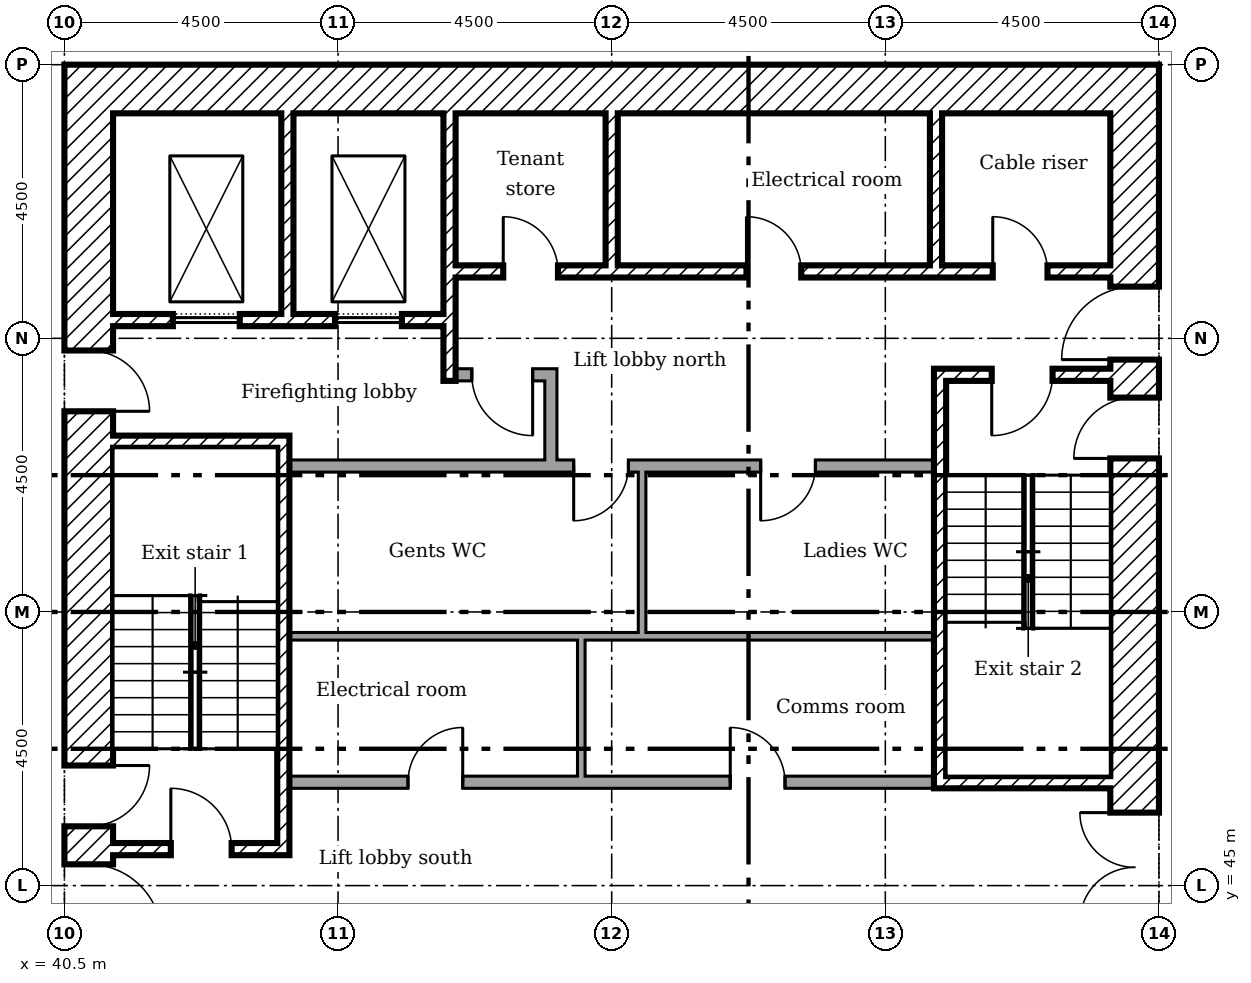
"""IFC4 building model, lengths in metres.
Left out: names, types, materials, properties, quantities, classifications, styles, units other than length and angle.
Written with IfcOpenShell. Run it as: python <this file> out.ifc"""

import sys

from ifc_helpers import new_model, si_unit, direction, frame, frame_2d, origin, place, context, subcontext, project, spatial, rectangle, extrude, element, fill, save


model = new_model("IFC4")
c1 = context("Model", 3, precision=1e-05, world=origin(), true_north=direction((0.0, 1.0)))
c2 = subcontext(c1, "Body", "Model", "MODEL_VIEW")
j1 = project(units=[si_unit("LENGTHUNIT", "METRE"), si_unit("PLANEANGLEUNIT", "RADIAN")], contexts=[c1])
p1 = place(None, origin())
s1 = spatial("IfcSite", under=j1, at=p1, CompositionType="ELEMENT")
p2 = place(p1, origin())
s2 = spatial("IfcBuilding", under=s1, at=p2, CompositionType="ELEMENT")
p3 = place(p2, frame((0.0, 0.0, 79.8)))
s3 = spatial("IfcBuildingStorey", under=s2, at=p3, CompositionType="ELEMENT", Elevation=79.8)
p4 = place(p3, frame((58.1, 40.5, 0.0), z_axis=(0.0, 0.0, 1.0), x_axis=(0.0, 1.0, 0.0)))
e1 = element("IfcWall", 1, at=p4, inside=s3, PredefinedType="SHEAR", context=c2, shape_type="SweptSolid", body=[
    extrude(rectangle(XDim=18.0, YDim=0.8, at=frame_2d((9.0, 0.0))), origin(), (0.0, 0.0, 1.0), 3.35),
])
p5 = place(p4, frame((13.15, 0.0, 0.0)))
e2 = element("IfcOpeningElement", 2, at=p5, cuts=e1, PredefinedType="OPENING", context=c2, shape_type="SweptSolid", body=[
    extrude(rectangle(XDim=1.2, YDim=2.1, at=frame_2d((0.6, 1.05))), frame((0.0, 0.41, 0.0), z_axis=(0.0, -1.0, 0.0), x_axis=(1.0, 0.0, 0.0)), (0.0, 0.0, 1.0), 0.82),
])
p6 = place(p4, frame((3.9, 0.0, 0.0)))
e3 = element("IfcOpeningElement", 3, at=p6, cuts=e1, PredefinedType="OPENING", context=c2, shape_type="SweptSolid", body=[
    extrude(rectangle(XDim=1.8, YDim=2.1, at=frame_2d((0.9, 1.05))), frame((0.0, 0.41, 0.0), z_axis=(0.0, -1.0, 0.0), x_axis=(1.0, 0.0, 0.0)), (0.0, 0.0, 1.0), 0.82),
])
p7 = place(p4, frame((11.525, 0.0, 0.0)))
e4 = element("IfcOpeningElement", 4, at=p7, cuts=e1, PredefinedType="OPENING", context=c2, shape_type="SweptSolid", body=[
    extrude(rectangle(XDim=1.0, YDim=2.1, at=frame_2d((0.5, 1.05))), frame((0.0, 0.41, 0.0), z_axis=(0.0, -1.0, 0.0), x_axis=(1.0, 0.0, 0.0)), (0.0, 0.0, 1.0), 0.82),
])
p8 = place(p3, frame((41.3, 58.1, 0.0)))
e5 = element("IfcWall", 5, at=p8, inside=s3, PredefinedType="SHEAR", context=c2, shape_type="SweptSolid", body=[
    extrude(rectangle(XDim=16.4, YDim=0.8, at=frame_2d((8.2, 0.0))), origin(), (0.0, 0.0, 1.0), 3.35),
])
p9 = place(p3, frame((40.9, 40.5, 0.0), z_axis=(0.0, 0.0, 1.0), x_axis=(0.0, 1.0, 0.0)))
e6 = element("IfcWall", 6, at=p9, inside=s3, PredefinedType="SHEAR", context=c2, shape_type="SweptSolid", body=[
    extrude(rectangle(XDim=18.0, YDim=0.8, at=frame_2d((9.0, 0.0))), origin(), (0.0, 0.0, 1.0), 3.35),
])
p10 = place(p9, frame((3.65, 0.0, 0.0)))
e7 = element("IfcOpeningElement", 7, at=p10, cuts=e6, PredefinedType="OPENING", context=c2, shape_type="SweptSolid", body=[
    extrude(rectangle(XDim=1.2, YDim=2.1, at=frame_2d((0.6, 1.05))), frame((0.0, 0.41, 0.0), z_axis=(0.0, -1.0, 0.0), x_axis=(1.0, 0.0, 0.0)), (0.0, 0.0, 1.0), 0.82),
])
p11 = place(p9, frame((5.475, 0.0, 0.0)))
e8 = element("IfcOpeningElement", 8, at=p11, cuts=e6, PredefinedType="OPENING", context=c2, shape_type="SweptSolid", body=[
    extrude(rectangle(XDim=1.0, YDim=2.1, at=frame_2d((0.5, 1.05))), frame((0.0, 0.41, 0.0), z_axis=(0.0, -1.0, 0.0), x_axis=(1.0, 0.0, 0.0)), (0.0, 0.0, 1.0), 0.82),
])
p12 = place(p9, frame((12.3, 0.0, 0.0)))
e9 = element("IfcOpeningElement", 9, at=p12, cuts=e6, PredefinedType="OPENING", context=c2, shape_type="SweptSolid", body=[
    extrude(rectangle(XDim=1.0, YDim=2.1, at=frame_2d((0.5, 1.05))), frame((0.0, 0.41, 0.0), z_axis=(0.0, -1.0, 0.0), x_axis=(1.0, 0.0, 0.0)), (0.0, 0.0, 1.0), 0.82),
])
p13 = place(p3, frame((44.167, 57.7, 0.0), z_axis=(0.0, 0.0, 1.0), x_axis=(0.0, -1.0, 0.0)))
e10 = element("IfcWall", 10, at=p13, inside=s3, PredefinedType="SHEAR", context=c2, shape_type="SweptSolid", body=[
    extrude(rectangle(XDim=3.3, YDim=0.2, at=frame_2d((1.65, 0.0))), origin(), (0.0, 0.0, 1.0), 3.35),
])
p14 = place(p3, frame((46.833, 57.7, 0.0), z_axis=(0.0, 0.0, 1.0), x_axis=(0.0, -1.0, 0.0)))
e11 = element("IfcWall", 11, at=p14, inside=s3, PredefinedType="SHEAR", context=c2, shape_type="SweptSolid", body=[
    extrude(rectangle(XDim=4.4, YDim=0.2, at=frame_2d((2.2, 0.0))), origin(), (0.0, 0.0, 1.0), 3.35),
])
for number, where, z_axis, x_axis in (
    (12, (49.5, 57.7, 0.0), (0.0, 0.0, 1.0), (0.0, -1.0, 0.0)),
    (13, (54.833, 57.7, 0.0), (0.0, 0.0, 1.0), (0.0, -1.0, 0.0)),
):
    element("IfcWall", number, at=place(p3, frame(where, z_axis=z_axis, x_axis=x_axis)), inside=s3, PredefinedType="SHEAR", context=c2, shape_type="SweptSolid", body=[
        extrude(rectangle(XDim=2.5, YDim=0.2, at=frame_2d((1.25, 0.0))), origin(), (0.0, 0.0, 1.0), 3.35),
    ])
p15 = place(p3, frame((48.5, 51.9, 0.0), z_axis=(0.0, 0.0, 1.0), x_axis=(0.0, 1.0, 0.0)))
e14 = element("IfcWall", 14, at=p15, inside=s3, PredefinedType="PARTITIONING", context=c2, shape_type="SweptSolid", body=[
    extrude(rectangle(XDim=1.6, YDim=0.2, at=frame_2d((0.8, 0.0))), origin(), (0.0, 0.0, 1.0), 3.35),
])
p16 = place(p3, frame((46.933, 53.4, 0.0)))
e15 = element("IfcWall", 15, at=p16, inside=s3, PredefinedType="PARTITIONING", context=c2, shape_type="SweptSolid", body=[
    extrude(rectangle(XDim=1.467, YDim=0.2, at=frame_2d((0.733, 0.0))), origin(), (0.0, 0.0, 1.0), 3.35),
])
p17 = place(p16, frame((0.267, 0.0, 0.0)))
e16 = element("IfcOpeningElement", 16, at=p17, cuts=e15, PredefinedType="OPENING", context=c2, shape_type="SweptSolid", body=[
    extrude(rectangle(XDim=1.0, YDim=2.1, at=frame_2d((0.5, 1.05))), frame((0.0, 0.11, 0.0), z_axis=(0.0, -1.0, 0.0), x_axis=(1.0, 0.0, 0.0)), (0.0, 0.0, 1.0), 0.22),
])
p18 = place(p3, frame((46.933, 55.1, 0.0)))
e17 = element("IfcWall", 17, at=p18, inside=s3, PredefinedType="SHEAR", context=c2, shape_type="SweptSolid", body=[
    extrude(rectangle(XDim=10.767, YDim=0.2, at=frame_2d((5.383, 0.0))), origin(), (0.0, 0.0, 1.0), 3.35),
])
p19 = place(p18, frame((8.833, 0.0, 0.0)))
e18 = element("IfcOpeningElement", 18, at=p19, cuts=e17, PredefinedType="OPENING", context=c2, shape_type="SweptSolid", body=[
    extrude(rectangle(XDim=0.9, YDim=2.1, at=frame_2d((0.45, 1.05))), frame((0.0, 0.11, 0.0), z_axis=(0.0, -1.0, 0.0), x_axis=(1.0, 0.0, 0.0)), (0.0, 0.0, 1.0), 0.22),
])
p20 = place(p18, frame((0.783, 0.0, 0.0)))
e19 = element("IfcOpeningElement", 19, at=p20, cuts=e17, PredefinedType="OPENING", context=c2, shape_type="SweptSolid", body=[
    extrude(rectangle(XDim=0.9, YDim=2.1, at=frame_2d((0.45, 1.05))), frame((0.0, 0.11, 0.0), z_axis=(0.0, -1.0, 0.0), x_axis=(1.0, 0.0, 0.0)), (0.0, 0.0, 1.0), 0.22),
])
p21 = place(p18, frame((4.783, 0.0, 0.0)))
e20 = element("IfcOpeningElement", 20, at=p21, cuts=e17, PredefinedType="OPENING", context=c2, shape_type="SweptSolid", body=[
    extrude(rectangle(XDim=0.9, YDim=2.1, at=frame_2d((0.45, 1.05))), frame((0.0, 0.11, 0.0), z_axis=(0.0, -1.0, 0.0), x_axis=(1.0, 0.0, 0.0)), (0.0, 0.0, 1.0), 0.22),
])
p22 = place(p3, frame((41.3, 54.3, 0.0)))
e21 = element("IfcWall", 21, at=p22, inside=s3, PredefinedType="SHEAR", context=c2, shape_type="SweptSolid", body=[
    extrude(rectangle(XDim=5.433, YDim=0.2, at=frame_2d((2.717, 0.0))), origin(), (0.0, 0.0, 1.0), 3.35),
])
p23 = place(p22, frame((0.983, 0.0, 0.0)))
e22 = element("IfcOpeningElement", 22, at=p23, cuts=e21, PredefinedType="OPENING", context=c2, shape_type="SweptSolid", body=[
    extrude(rectangle(XDim=1.1, YDim=2.1, at=frame_2d((0.55, 1.05))), frame((0.0, 0.11, 0.0), z_axis=(0.0, -1.0, 0.0), x_axis=(1.0, 0.0, 0.0)), (0.0, 0.0, 1.0), 0.22),
])
p24 = place(p22, frame((3.65, 0.0, 0.0)))
e23 = element("IfcOpeningElement", 23, at=p24, cuts=e21, PredefinedType="OPENING", context=c2, shape_type="SweptSolid", body=[
    extrude(rectangle(XDim=1.1, YDim=2.1, at=frame_2d((0.55, 1.05))), frame((0.0, 0.11, 0.0), z_axis=(0.0, -1.0, 0.0), x_axis=(1.0, 0.0, 0.0)), (0.0, 0.0, 1.0), 0.22),
])
p25 = place(p3, frame((44.1, 45.5, 0.0), z_axis=(0.0, 0.0, 1.0), x_axis=(0.0, 1.0, 0.0)))
e24 = element("IfcWall", 24, at=p25, inside=s3, PredefinedType="SHEAR", context=c2, shape_type="SweptSolid", body=[
    extrude(rectangle(XDim=6.9, YDim=0.2, at=frame_2d((3.45, 0.0))), origin(), (0.0, 0.0, 1.0), 3.35),
])
p26 = place(p3, frame((41.3, 52.3, 0.0)))
e25 = element("IfcWall", 25, at=p26, inside=s3, PredefinedType="SHEAR", context=c2, shape_type="SweptSolid", body=[
    extrude(rectangle(XDim=2.7, YDim=0.2, at=frame_2d((1.35, 0.0))), origin(), (0.0, 0.0, 1.0), 3.35),
])
p27 = place(p3, frame((41.3, 45.6, 0.0)))
e26 = element("IfcWall", 26, at=p27, inside=s3, PredefinedType="SHEAR", context=c2, shape_type="SweptSolid", body=[
    extrude(rectangle(XDim=2.7, YDim=0.2, at=frame_2d((1.35, 0.0))), origin(), (0.0, 0.0, 1.0), 3.35),
])
p28 = place(p27, frame((0.95, 0.0, 0.0)))
e27 = element("IfcOpeningElement", 27, at=p28, cuts=e26, PredefinedType="OPENING", context=c2, shape_type="SweptSolid", body=[
    extrude(rectangle(XDim=1.0, YDim=2.1, at=frame_2d((0.5, 1.05))), frame((0.0, 0.11, 0.0), z_axis=(0.0, -1.0, 0.0), x_axis=(1.0, 0.0, 0.0)), (0.0, 0.0, 1.0), 0.22),
])
p29 = place(p3, frame((54.8, 53.4, 0.0)))
e28 = element("IfcWall", 28, at=p29, inside=s3, PredefinedType="SHEAR", context=c2, shape_type="SweptSolid", body=[
    extrude(rectangle(XDim=2.9, YDim=0.2, at=frame_2d((1.45, 0.0))), origin(), (0.0, 0.0, 1.0), 3.35),
])
p30 = place(p29, frame((0.95, 0.0, 0.0)))
e29 = element("IfcOpeningElement", 29, at=p30, cuts=e28, PredefinedType="OPENING", context=c2, shape_type="SweptSolid", body=[
    extrude(rectangle(XDim=1.0, YDim=2.1, at=frame_2d((0.5, 1.05))), frame((0.0, 0.11, 0.0), z_axis=(0.0, -1.0, 0.0), x_axis=(1.0, 0.0, 0.0)), (0.0, 0.0, 1.0), 0.22),
])
p31 = place(p3, frame((54.8, 46.7, 0.0)))
e30 = element("IfcWall", 30, at=p31, inside=s3, PredefinedType="SHEAR", context=c2, shape_type="SweptSolid", body=[
    extrude(rectangle(XDim=2.9, YDim=0.2, at=frame_2d((1.45, 0.0))), origin(), (0.0, 0.0, 1.0), 3.35),
])
p32 = place(p3, frame((54.9, 46.8, 0.0), z_axis=(0.0, 0.0, 1.0), x_axis=(0.0, 1.0, 0.0)))
e31 = element("IfcWall", 31, at=p32, inside=s3, PredefinedType="SHEAR", context=c2, shape_type="SweptSolid", body=[
    extrude(rectangle(XDim=6.5, YDim=0.2, at=frame_2d((3.25, 0.0))), origin(), (0.0, 0.0, 1.0), 3.35),
])
p33 = place(p3, frame((44.2, 51.9, 0.0)))
e32 = element("IfcWall", 32, at=p33, inside=s3, PredefinedType="PARTITIONING", context=c2, shape_type="SweptSolid", body=[
    extrude(rectangle(XDim=10.6, YDim=0.2, at=frame_2d((5.3, 0.0))), origin(), (0.0, 0.0, 1.0), 3.35),
])
p34 = place(p33, frame((4.675, 0.0, 0.0)))
e33 = element("IfcOpeningElement", 33, at=p34, cuts=e32, PredefinedType="OPENING", context=c2, shape_type="SweptSolid", body=[
    extrude(rectangle(XDim=0.9, YDim=2.1, at=frame_2d((0.45, 1.05))), frame((0.0, 0.11, 0.0), z_axis=(0.0, -1.0, 0.0), x_axis=(1.0, 0.0, 0.0)), (0.0, 0.0, 1.0), 0.22),
])
p35 = place(p33, frame((7.75, 0.0, 0.0)))
e34 = element("IfcOpeningElement", 34, at=p35, cuts=e32, PredefinedType="OPENING", context=c2, shape_type="SweptSolid", body=[
    extrude(rectangle(XDim=0.9, YDim=2.1, at=frame_2d((0.45, 1.05))), frame((0.0, 0.11, 0.0), z_axis=(0.0, -1.0, 0.0), x_axis=(1.0, 0.0, 0.0)), (0.0, 0.0, 1.0), 0.22),
])
p36 = place(p3, frame((44.2, 46.7, 0.0)))
e35 = element("IfcWall", 35, at=p36, inside=s3, PredefinedType="PARTITIONING", context=c2, shape_type="SweptSolid", body=[
    extrude(rectangle(XDim=10.6, YDim=0.2, at=frame_2d((5.3, 0.0))), origin(), (0.0, 0.0, 1.0), 3.35),
])
p37 = place(p36, frame((1.95, 0.0, 0.0)))
e36 = element("IfcOpeningElement", 36, at=p37, cuts=e35, PredefinedType="OPENING", context=c2, shape_type="SweptSolid", body=[
    extrude(rectangle(XDim=0.9, YDim=2.1, at=frame_2d((0.45, 1.05))), frame((0.0, 0.11, 0.0), z_axis=(0.0, -1.0, 0.0), x_axis=(1.0, 0.0, 0.0)), (0.0, 0.0, 1.0), 0.22),
])
p38 = place(p36, frame((7.25, 0.0, 0.0)))
e37 = element("IfcOpeningElement", 37, at=p38, cuts=e35, PredefinedType="OPENING", context=c2, shape_type="SweptSolid", body=[
    extrude(rectangle(XDim=0.9, YDim=2.1, at=frame_2d((0.45, 1.05))), frame((0.0, 0.11, 0.0), z_axis=(0.0, -1.0, 0.0), x_axis=(1.0, 0.0, 0.0)), (0.0, 0.0, 1.0), 0.22),
])
p39 = place(p3, frame((49.0, 46.8, 0.0), z_axis=(0.0, 0.0, 1.0), x_axis=(0.0, 1.0, 0.0)))
e38 = element("IfcWall", 38, at=p39, inside=s3, PredefinedType="PARTITIONING", context=c2, shape_type="SweptSolid", body=[
    extrude(rectangle(XDim=2.363, YDim=0.125, at=frame_2d((1.181, 0.0))), origin(), (0.0, 0.0, 1.0), 3.35),
])
p40 = place(p3, frame((49.0, 49.1, 0.0), z_axis=(0.0, 0.0, 1.0), x_axis=(-1.0, 0.0, 0.0)))
e39 = element("IfcWall", 39, at=p40, inside=s3, PredefinedType="PARTITIONING", context=c2, shape_type="SweptSolid", body=[
    extrude(rectangle(XDim=4.8, YDim=0.125, at=frame_2d((2.4, 0.0))), origin(), (0.0, 0.0, 1.0), 3.35),
])
p41 = place(p3, frame((50.062, 49.1, 0.0), z_axis=(0.0, 0.0, 1.0), x_axis=(-1.0, 0.0, 0.0)))
e40 = element("IfcWall", 40, at=p41, inside=s3, PredefinedType="PARTITIONING", context=c2, shape_type="SweptSolid", body=[
    extrude(rectangle(XDim=1.0, YDim=0.125, at=frame_2d((0.5, 0.0))), origin(), (0.0, 0.0, 1.0), 3.35),
])
p42 = place(p3, frame((54.8, 49.1, 0.0), z_axis=(0.0, 0.0, 1.0), x_axis=(-1.0, 0.0, 0.0)))
e41 = element("IfcWall", 41, at=p42, inside=s3, PredefinedType="PARTITIONING", context=c2, shape_type="SweptSolid", body=[
    extrude(rectangle(XDim=4.8, YDim=0.125, at=frame_2d((2.4, 0.0))), origin(), (0.0, 0.0, 1.0), 3.35),
])
p43 = place(p3, frame((50.0, 49.163, 0.0), z_axis=(0.0, 0.0, 1.0), x_axis=(0.0, 1.0, 0.0)))
e42 = element("IfcWall", 42, at=p43, inside=s3, PredefinedType="PARTITIONING", context=c2, shape_type="SweptSolid", body=[
    extrude(rectangle(XDim=2.637, YDim=0.125, at=frame_2d((1.319, 0.0))), origin(), (0.0, 0.0, 1.0), 3.35),
])
p44 = place(p5, origin())
e43 = element("IfcDoor", 43, at=p44, inside=s3, OperationType="SINGLE_SWING_RIGHT", PredefinedType="DOOR", context=c2, shape_type="SweptSolid", body=[
    extrude(rectangle(XDim=1.2, YDim=2.1, at=frame_2d((0.6, 1.05))), frame((0.0, 0.025, 0.0), z_axis=(0.0, -1.0, 0.0), x_axis=(1.0, 0.0, 0.0)), (0.0, 0.0, 1.0), 0.05),
])
fill(e2, e43)
p45 = place(p6, origin())
e44 = element("IfcDoor", 44, at=p45, inside=s3, OperationType="DOUBLE_DOOR_SINGLE_SWING", PredefinedType="DOOR", context=c2, shape_type="SweptSolid", body=[
    extrude(rectangle(XDim=1.8, YDim=2.1, at=frame_2d((0.9, 1.05))), frame((0.0, 0.025, 0.0), z_axis=(0.0, -1.0, 0.0), x_axis=(1.0, 0.0, 0.0)), (0.0, 0.0, 1.0), 0.05),
])
fill(e3, e44)
p46 = place(p10, frame((1.2, 0.0, 0.0), x_axis=(-1.0, 0.0, 0.0)))
e45 = element("IfcDoor", 45, at=p46, inside=s3, OperationType="SINGLE_SWING_LEFT", PredefinedType="DOOR", context=c2, shape_type="SweptSolid", body=[
    extrude(rectangle(XDim=1.2, YDim=2.1, at=frame_2d((0.6, 1.05))), frame((0.0, 0.025, 0.0), z_axis=(0.0, -1.0, 0.0), x_axis=(1.0, 0.0, 0.0)), (0.0, 0.0, 1.0), 0.05),
])
fill(e7, e45)
p47 = place(p28, origin())
e46 = element("IfcDoor", 46, at=p47, inside=s3, OperationType="SINGLE_SWING_RIGHT", PredefinedType="DOOR", context=c2, shape_type="SweptSolid", body=[
    extrude(rectangle(XDim=1.0, YDim=2.1, at=frame_2d((0.5, 1.05))), frame((0.0, 0.025, 0.0), z_axis=(0.0, -1.0, 0.0), x_axis=(1.0, 0.0, 0.0)), (0.0, 0.0, 1.0), 0.05),
])
fill(e27, e46)
p48 = place(p11, frame((1.0, 0.0, 0.0), x_axis=(-1.0, 0.0, 0.0)))
e47 = element("IfcDoor", 47, at=p48, inside=s3, OperationType="SINGLE_SWING_RIGHT", PredefinedType="DOOR", context=c2, shape_type="SweptSolid", body=[
    extrude(rectangle(XDim=1.0, YDim=2.1, at=frame_2d((0.5, 1.05))), frame((0.0, 0.025, 0.0), z_axis=(0.0, -1.0, 0.0), x_axis=(1.0, 0.0, 0.0)), (0.0, 0.0, 1.0), 0.05),
])
fill(e8, e47)
p49 = place(p30, frame((1.0, 0.0, 0.0), x_axis=(-1.0, 0.0, 0.0)))
e48 = element("IfcDoor", 48, at=p49, inside=s3, OperationType="SINGLE_SWING_LEFT", PredefinedType="DOOR", context=c2, shape_type="SweptSolid", body=[
    extrude(rectangle(XDim=1.0, YDim=2.1, at=frame_2d((0.5, 1.05))), frame((0.0, 0.025, 0.0), z_axis=(0.0, -1.0, 0.0), x_axis=(1.0, 0.0, 0.0)), (0.0, 0.0, 1.0), 0.05),
])
fill(e29, e48)
p50 = place(p7, origin())
e49 = element("IfcDoor", 49, at=p50, inside=s3, OperationType="SINGLE_SWING_RIGHT", PredefinedType="DOOR", context=c2, shape_type="SweptSolid", body=[
    extrude(rectangle(XDim=1.0, YDim=2.1, at=frame_2d((0.5, 1.05))), frame((0.0, 0.025, 0.0), z_axis=(0.0, -1.0, 0.0), x_axis=(1.0, 0.0, 0.0)), (0.0, 0.0, 1.0), 0.05),
])
fill(e4, e49)
p51 = place(p17, frame((1.0, 0.0, 0.0), x_axis=(-1.0, 0.0, 0.0)))
e50 = element("IfcDoor", 50, at=p51, inside=s3, OperationType="SINGLE_SWING_RIGHT", PredefinedType="DOOR", context=c2, shape_type="SweptSolid", body=[
    extrude(rectangle(XDim=1.0, YDim=2.1, at=frame_2d((0.5, 1.05))), frame((0.0, 0.025, 0.0), z_axis=(0.0, -1.0, 0.0), x_axis=(1.0, 0.0, 0.0)), (0.0, 0.0, 1.0), 0.05),
])
fill(e16, e50)
p52 = place(p12, frame((1.0, 0.0, 0.0), x_axis=(-1.0, 0.0, 0.0)))
e51 = element("IfcDoor", 51, at=p52, inside=s3, OperationType="SINGLE_SWING_LEFT", PredefinedType="DOOR", context=c2, shape_type="SweptSolid", body=[
    extrude(rectangle(XDim=1.0, YDim=2.1, at=frame_2d((0.5, 1.05))), frame((0.0, 0.025, 0.0), z_axis=(0.0, -1.0, 0.0), x_axis=(1.0, 0.0, 0.0)), (0.0, 0.0, 1.0), 0.05),
])
fill(e9, e51)
p53 = place(p19, origin())
e52 = element("IfcDoor", 52, at=p53, inside=s3, OperationType="SINGLE_SWING_RIGHT", PredefinedType="DOOR", context=c2, shape_type="SweptSolid", body=[
    extrude(rectangle(XDim=0.9, YDim=2.1, at=frame_2d((0.45, 1.05))), frame((0.0, 0.025, 0.0), z_axis=(0.0, -1.0, 0.0), x_axis=(1.0, 0.0, 0.0)), (0.0, 0.0, 1.0), 0.05),
])
fill(e18, e52)
p54 = place(p20, origin())
e53 = element("IfcDoor", 53, at=p54, inside=s3, OperationType="SINGLE_SWING_RIGHT", PredefinedType="DOOR", context=c2, shape_type="SweptSolid", body=[
    extrude(rectangle(XDim=0.9, YDim=2.1, at=frame_2d((0.45, 1.05))), frame((0.0, 0.025, 0.0), z_axis=(0.0, -1.0, 0.0), x_axis=(1.0, 0.0, 0.0)), (0.0, 0.0, 1.0), 0.05),
])
fill(e19, e53)
p55 = place(p21, origin())
e54 = element("IfcDoor", 54, at=p55, inside=s3, OperationType="SINGLE_SWING_RIGHT", PredefinedType="DOOR", context=c2, shape_type="SweptSolid", body=[
    extrude(rectangle(XDim=0.9, YDim=2.1, at=frame_2d((0.45, 1.05))), frame((0.0, 0.025, 0.0), z_axis=(0.0, -1.0, 0.0), x_axis=(1.0, 0.0, 0.0)), (0.0, 0.0, 1.0), 0.05),
])
fill(e20, e54)
p56 = place(p37, origin())
e55 = element("IfcDoor", 55, at=p56, inside=s3, OperationType="SINGLE_SWING_LEFT", PredefinedType="DOOR", context=c2, shape_type="SweptSolid", body=[
    extrude(rectangle(XDim=0.9, YDim=2.1, at=frame_2d((0.45, 1.05))), frame((0.0, 0.025, 0.0), z_axis=(0.0, -1.0, 0.0), x_axis=(1.0, 0.0, 0.0)), (0.0, 0.0, 1.0), 0.05),
])
fill(e36, e55)
p57 = place(p38, origin())
e56 = element("IfcDoor", 56, at=p57, inside=s3, OperationType="SINGLE_SWING_RIGHT", PredefinedType="DOOR", context=c2, shape_type="SweptSolid", body=[
    extrude(rectangle(XDim=0.9, YDim=2.1, at=frame_2d((0.45, 1.05))), frame((0.0, 0.025, 0.0), z_axis=(0.0, -1.0, 0.0), x_axis=(1.0, 0.0, 0.0)), (0.0, 0.0, 1.0), 0.05),
])
fill(e37, e56)
p58 = place(p34, frame((0.9, 0.0, 0.0), x_axis=(-1.0, 0.0, 0.0)))
e57 = element("IfcDoor", 57, at=p58, inside=s3, OperationType="SINGLE_SWING_LEFT", PredefinedType="DOOR", context=c2, shape_type="SweptSolid", body=[
    extrude(rectangle(XDim=0.9, YDim=2.1, at=frame_2d((0.45, 1.05))), frame((0.0, 0.025, 0.0), z_axis=(0.0, -1.0, 0.0), x_axis=(1.0, 0.0, 0.0)), (0.0, 0.0, 1.0), 0.05),
])
fill(e33, e57)
p59 = place(p35, frame((0.9, 0.0, 0.0), x_axis=(-1.0, 0.0, 0.0)))
e58 = element("IfcDoor", 58, at=p59, inside=s3, OperationType="SINGLE_SWING_LEFT", PredefinedType="DOOR", context=c2, shape_type="SweptSolid", body=[
    extrude(rectangle(XDim=0.9, YDim=2.1, at=frame_2d((0.45, 1.05))), frame((0.0, 0.025, 0.0), z_axis=(0.0, -1.0, 0.0), x_axis=(1.0, 0.0, 0.0)), (0.0, 0.0, 1.0), 0.05),
])
fill(e34, e58)
p60 = place(p23, origin())
e59 = element("IfcDoor", 59, at=p60, inside=s3, OperationType="SLIDING_TO_LEFT", PredefinedType="DOOR", context=c2, shape_type="SweptSolid", body=[
    extrude(rectangle(XDim=1.1, YDim=2.1, at=frame_2d((0.55, 1.05))), frame((0.0, 0.025, 0.0), z_axis=(0.0, -1.0, 0.0), x_axis=(1.0, 0.0, 0.0)), (0.0, 0.0, 1.0), 0.05),
])
fill(e22, e59)
p61 = place(p24, origin())
e60 = element("IfcDoor", 60, at=p61, inside=s3, OperationType="SLIDING_TO_LEFT", PredefinedType="DOOR", context=c2, shape_type="SweptSolid", body=[
    extrude(rectangle(XDim=1.1, YDim=2.1, at=frame_2d((0.55, 1.05))), frame((0.0, 0.025, 0.0), z_axis=(0.0, -1.0, 0.0), x_axis=(1.0, 0.0, 0.0)), (0.0, 0.0, 1.0), 0.05),
])
fill(e23, e60)
save(model, sys.argv[1])
